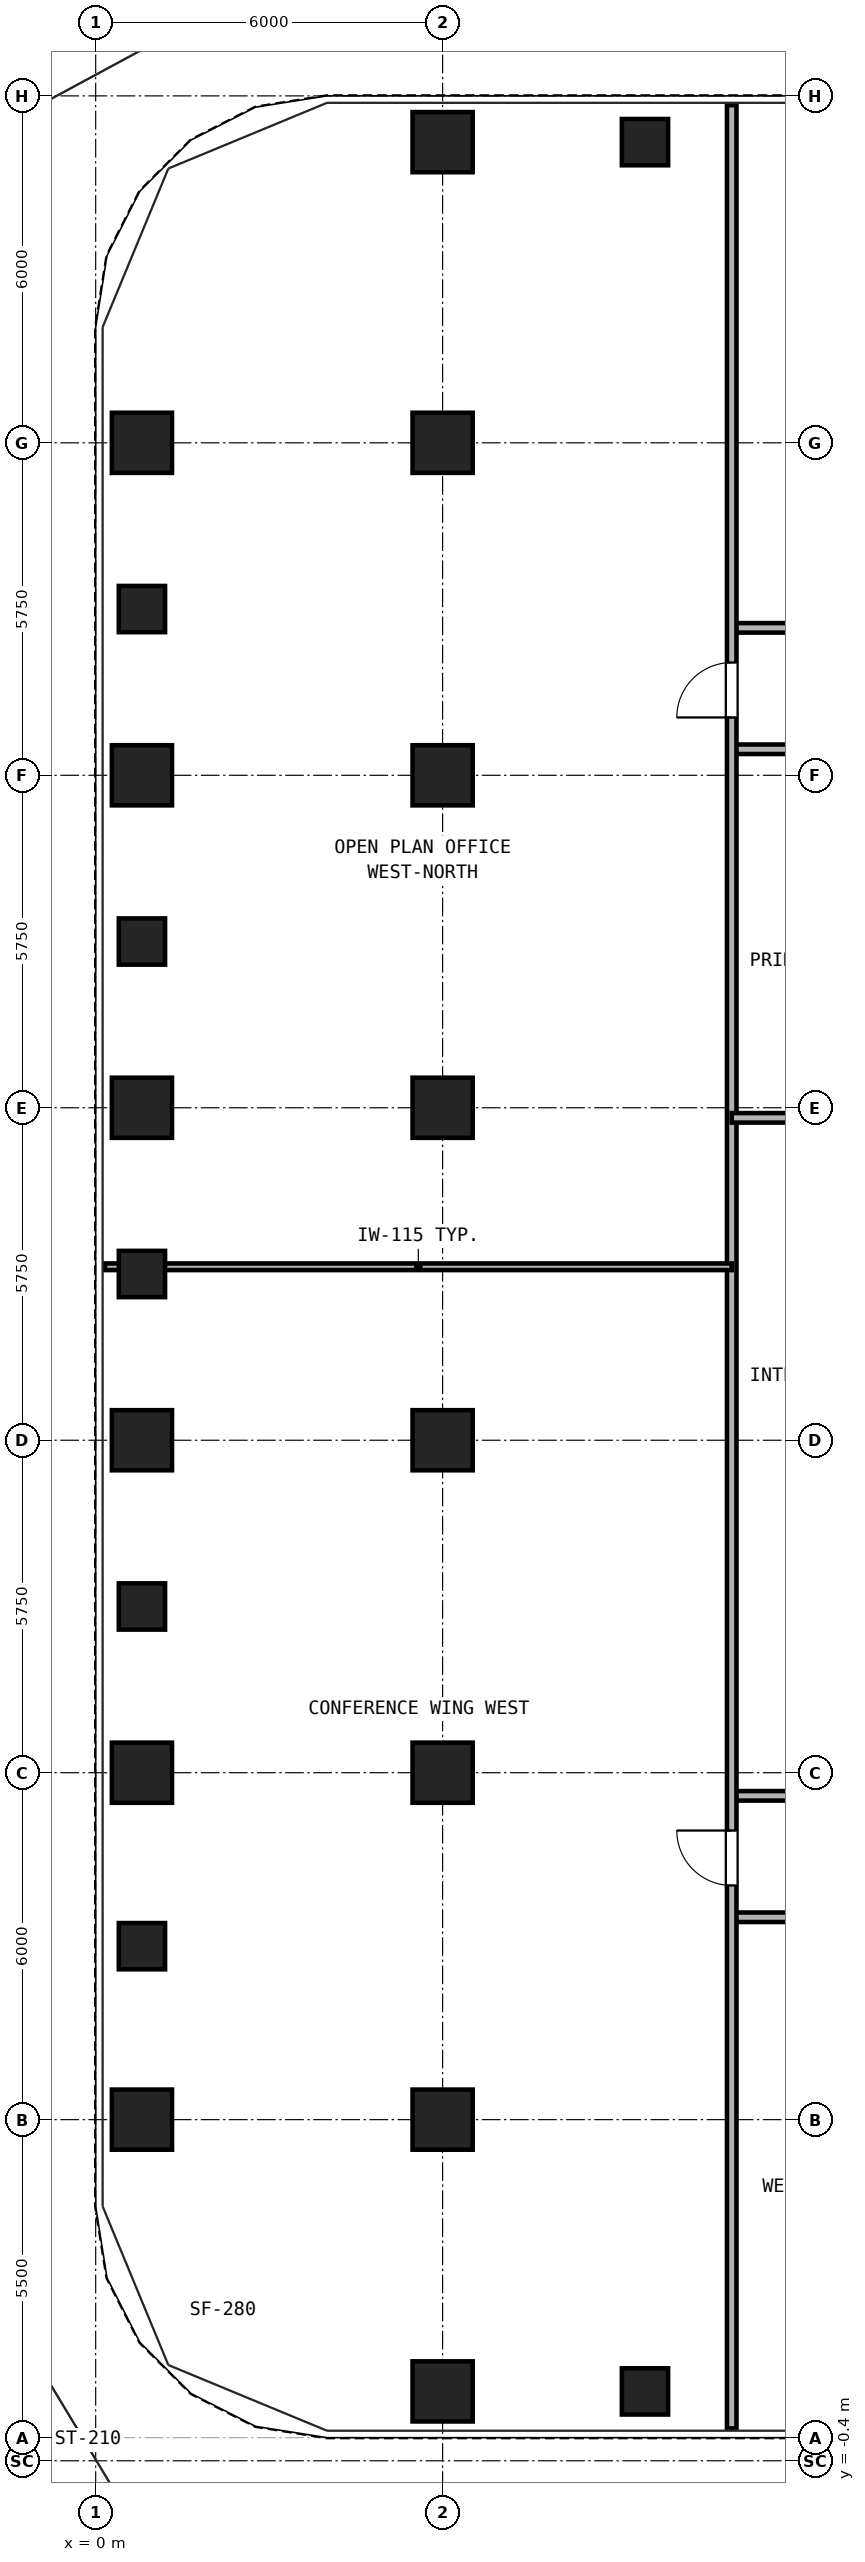
"""IFC4 building model, lengths in metres.
Left out: names, types, materials, properties, quantities, classifications, styles, units other than length and angle.
Written with IfcOpenShell. Run it as: python <this file> out.ifc"""

import sys

from ifc_helpers import new_model, si_unit, direction, frame, frame_2d, origin, origin_2d, place, context, subcontext, project, spatial, rectangle, hollow_rectangle, extrude, source, transform, mapped, element, fill, save


model = new_model("IFC4")
c1 = context("Model", 3, precision=1e-05, world=origin(), true_north=direction((0.0, 1.0)))
c2 = subcontext(c1, "Body", "Model", "MODEL_VIEW")
j1 = project(units=[si_unit("LENGTHUNIT", "METRE"), si_unit("PLANEANGLEUNIT", "RADIAN")], contexts=[c1])
p1 = place(None, origin())
s1 = spatial("IfcSite", under=j1, at=p1, CompositionType="ELEMENT")
p2 = place(p1, origin())
s2 = spatial("IfcBuilding", under=s1, at=p2, CompositionType="ELEMENT")
p3 = place(p2, frame((0.0, 0.0, 72.9)))
s3 = spatial("IfcBuildingStorey", under=s2, at=p3, CompositionType="ELEMENT", Elevation=72.9)
m1 = source(origin(), c2, "Body", "SweptSolid", [
    extrude(hollow_rectangle(XDim=1.04, YDim=1.04, WallThickness=0.065, at=origin_2d()), origin(), (0.0, 0.0, 1.0), 3.24),
])
for number, where, z_axis, x_axis in (
    (1, (6.0, 0.8, 0.0), (0.0, 0.0, 1.0), (1.0, 0.0, 0.0)),
    (2, (6.0, 39.7, 0.0), (0.0, 0.0, 1.0), (1.0, 0.0, 0.0)),
    (3, (0.8, 5.5, 0.0), (0.0, 0.0, 1.0), (1.0, 0.0, 0.0)),
    (4, (0.8, 11.5, 0.0), (0.0, 0.0, 1.0), (1.0, 0.0, 0.0)),
    (5, (0.8, 17.25, 0.0), (0.0, 0.0, 1.0), (1.0, 0.0, 0.0)),
    (6, (0.8, 23.0, 0.0), (0.0, 0.0, 1.0), (1.0, 0.0, 0.0)),
    (7, (0.8, 28.75, 0.0), (0.0, 0.0, 1.0), (1.0, 0.0, 0.0)),
    (8, (0.8, 34.5, 0.0), (0.0, 0.0, 1.0), (1.0, 0.0, 0.0)),
    (9, (6.0, 5.5, 0.0), (0.0, 0.0, 1.0), (1.0, 0.0, 0.0)),
    (10, (6.0, 11.5, 0.0), (0.0, 0.0, 1.0), (1.0, 0.0, 0.0)),
    (11, (6.0, 17.25, 0.0), (0.0, 0.0, 1.0), (1.0, 0.0, 0.0)),
    (12, (6.0, 23.0, 0.0), (0.0, 0.0, 1.0), (1.0, 0.0, 0.0)),
    (13, (6.0, 28.75, 0.0), (0.0, 0.0, 1.0), (1.0, 0.0, 0.0)),
    (14, (6.0, 34.5, 0.0), (0.0, 0.0, 1.0), (1.0, 0.0, 0.0)),
):
    element("IfcColumn", number, at=place(p3, frame(where, z_axis=z_axis, x_axis=x_axis)), inside=s3, PredefinedType="COLUMN", context=c2, shape_type="MappedRepresentation", body=[
        mapped(m1, transform((0.0, 0.0, 0.0), x_axis=(1.0, 0.0, 0.0), y_axis=(0.0, 1.0, 0.0), z_axis=(0.0, 0.0, 1.0), scale=1.0)),
    ])
m2 = source(origin(), c2, "Body", "SweptSolid", [
    extrude(hollow_rectangle(XDim=0.8, YDim=0.8, WallThickness=0.045, at=origin_2d()), origin(), (0.0, 0.0, 1.0), 3.24),
])
for number, where, z_axis, x_axis in (
    (15, (9.5, 0.8, 0.0), (0.0, 0.0, 1.0), (1.0, 0.0, 0.0)),
    (16, (9.5, 39.7, 0.0), (0.0, 0.0, 1.0), (1.0, 0.0, 0.0)),
    (17, (0.8, 8.5, 0.0), (0.0, 0.0, 1.0), (1.0, 0.0, 0.0)),
    (18, (0.8, 14.375, 0.0), (0.0, 0.0, 1.0), (1.0, 0.0, 0.0)),
    (19, (0.8, 20.125, 0.0), (0.0, 0.0, 1.0), (1.0, 0.0, 0.0)),
    (20, (0.8, 25.875, 0.0), (0.0, 0.0, 1.0), (1.0, 0.0, 0.0)),
    (21, (0.8, 31.625, 0.0), (0.0, 0.0, 1.0), (1.0, 0.0, 0.0)),
):
    element("IfcColumn", number, at=place(p3, frame(where, z_axis=z_axis, x_axis=x_axis)), inside=s3, PredefinedType="COLUMN", context=c2, shape_type="MappedRepresentation", body=[
        mapped(m2, transform((0.0, 0.0, 0.0), x_axis=(1.0, 0.0, 0.0), y_axis=(0.0, 1.0, 0.0), z_axis=(0.0, 0.0, 1.0), scale=1.0)),
    ])
p4 = place(p3, frame((11.0, 9.0, 0.0), z_axis=(0.0, 0.0, 1.0), x_axis=(1.0, 0.0, 0.0)))
e22 = element("IfcWall", 22, at=p4, inside=s3, PredefinedType="PARTITIONING", context=c2, shape_type="SweptSolid", body=[
    extrude(rectangle(XDim=25.0, YDim=0.165, at=frame_2d((12.5, 0.0))), origin(), (0.0, 0.0, 1.0), 3.24),
])
p5 = place(p4, frame((2.25, 0.0, 0.0)))
e23 = element("IfcOpeningElement", 23, at=p5, cuts=e22, PredefinedType="OPENING", context=c2, shape_type="SweptSolid", body=[
    extrude(rectangle(XDim=0.95, YDim=2.15, at=frame_2d((0.475, 1.075))), frame((0.0, 0.093, 0.0), z_axis=(0.0, -1.0, 0.0), x_axis=(1.0, 0.0, 0.0)), (0.0, 0.0, 1.0), 0.185),
])
p6 = place(p4, frame((8.0, 0.0, 0.0)))
e24 = element("IfcOpeningElement", 24, at=p6, cuts=e22, PredefinedType="OPENING", context=c2, shape_type="SweptSolid", body=[
    extrude(rectangle(XDim=0.95, YDim=2.15, at=frame_2d((0.475, 1.075))), frame((0.0, 0.093, 0.0), z_axis=(0.0, -1.0, 0.0), x_axis=(1.0, 0.0, 0.0)), (0.0, 0.0, 1.0), 0.185),
])
p7 = place(p4, frame((14.0, 0.0, 0.0)))
e25 = element("IfcOpeningElement", 25, at=p7, cuts=e22, PredefinedType="OPENING", context=c2, shape_type="SweptSolid", body=[
    extrude(rectangle(XDim=0.95, YDim=2.15, at=frame_2d((0.475, 1.075))), frame((0.0, 0.093, 0.0), z_axis=(0.0, -1.0, 0.0), x_axis=(1.0, 0.0, 0.0)), (0.0, 0.0, 1.0), 0.185),
])
p8 = place(p4, frame((19.5, 0.0, 0.0)))
e26 = element("IfcOpeningElement", 26, at=p8, cuts=e22, PredefinedType="OPENING", context=c2, shape_type="SweptSolid", body=[
    extrude(rectangle(XDim=0.95, YDim=2.15, at=frame_2d((0.475, 1.075))), frame((0.0, 0.093, 0.0), z_axis=(0.0, -1.0, 0.0), x_axis=(1.0, 0.0, 0.0)), (0.0, 0.0, 1.0), 0.185),
])
p9 = place(p4, frame((23.25, 0.0, 0.0)))
e27 = element("IfcOpeningElement", 27, at=p9, cuts=e22, PredefinedType="OPENING", context=c2, shape_type="SweptSolid", body=[
    extrude(rectangle(XDim=0.92, YDim=2.1, at=frame_2d((0.46, 1.05))), frame((0.0, 0.093, 0.0), z_axis=(0.0, -1.0, 0.0), x_axis=(1.0, 0.0, 0.0)), (0.0, 0.0, 1.0), 0.185),
])
p10 = place(p3, frame((11.0, 31.3, 0.0), z_axis=(0.0, 0.0, 1.0), x_axis=(1.0, 0.0, 0.0)))
e28 = element("IfcWall", 28, at=p10, inside=s3, PredefinedType="PARTITIONING", context=c2, shape_type="SweptSolid", body=[
    extrude(rectangle(XDim=25.0, YDim=0.165, at=frame_2d((12.5, 0.0))), origin(), (0.0, 0.0, 1.0), 3.24),
])
p11 = place(p10, frame((4.25, 0.0, 0.0)))
e29 = element("IfcOpeningElement", 29, at=p11, cuts=e28, PredefinedType="OPENING", context=c2, shape_type="SweptSolid", body=[
    extrude(rectangle(XDim=0.95, YDim=2.15, at=frame_2d((0.475, 1.075))), frame((0.0, 0.093, 0.0), z_axis=(0.0, -1.0, 0.0), x_axis=(1.0, 0.0, 0.0)), (0.0, 0.0, 1.0), 0.185),
])
p12 = place(p10, frame((12.0, 0.0, 0.0)))
e30 = element("IfcOpeningElement", 30, at=p12, cuts=e28, PredefinedType="OPENING", context=c2, shape_type="SweptSolid", body=[
    extrude(rectangle(XDim=0.95, YDim=2.15, at=frame_2d((0.475, 1.075))), frame((0.0, 0.093, 0.0), z_axis=(0.0, -1.0, 0.0), x_axis=(1.0, 0.0, 0.0)), (0.0, 0.0, 1.0), 0.185),
])
p13 = place(p10, frame((17.5, 0.0, 0.0)))
e31 = element("IfcOpeningElement", 31, at=p13, cuts=e28, PredefinedType="OPENING", context=c2, shape_type="SweptSolid", body=[
    extrude(rectangle(XDim=0.95, YDim=2.15, at=frame_2d((0.475, 1.075))), frame((0.0, 0.093, 0.0), z_axis=(0.0, -1.0, 0.0), x_axis=(1.0, 0.0, 0.0)), (0.0, 0.0, 1.0), 0.185),
])
p14 = place(p10, frame((22.25, 0.0, 0.0)))
e32 = element("IfcOpeningElement", 32, at=p14, cuts=e28, PredefinedType="OPENING", context=c2, shape_type="SweptSolid", body=[
    extrude(rectangle(XDim=0.95, YDim=2.15, at=frame_2d((0.475, 1.075))), frame((0.0, 0.093, 0.0), z_axis=(0.0, -1.0, 0.0), x_axis=(1.0, 0.0, 0.0)), (0.0, 0.0, 1.0), 0.185),
])
for number, where, z_axis, x_axis in (
    (33, (11.0, 11.1, 0.0), (0.0, 0.0, 1.0), (1.0, 0.0, 0.0)),
    (34, (11.0, 29.2, 0.0), (0.0, 0.0, 1.0), (1.0, 0.0, 0.0)),
):
    element("IfcWall", number, at=place(p3, frame(where, z_axis=z_axis, x_axis=x_axis)), inside=s3, PredefinedType="PARTITIONING", context=c2, shape_type="SweptSolid", body=[
        extrude(rectangle(XDim=5.3, YDim=0.165, at=frame_2d((2.65, 0.0))), origin(), (0.0, 0.0, 1.0), 3.24),
    ])
p15 = place(p3, frame((11.0, 0.16, 0.0), z_axis=(0.0, 0.0, 1.0), x_axis=(0.0, 1.0, 0.0)))
e35 = element("IfcWall", 35, at=p15, inside=s3, PredefinedType="PARTITIONING", context=c2, shape_type="SweptSolid", body=[
    extrude(rectangle(XDim=40.18, YDim=0.165, at=frame_2d((20.09, 0.0))), origin(), (0.0, 0.0, 1.0), 3.24),
])
p16 = place(p15, frame((9.39, 0.0, 0.0)))
e36 = element("IfcOpeningElement", 36, at=p16, cuts=e35, PredefinedType="OPENING", context=c2, shape_type="SweptSolid", body=[
    extrude(rectangle(XDim=0.95, YDim=2.15, at=frame_2d((0.475, 1.075))), frame((0.0, 0.093, 0.0), z_axis=(0.0, -1.0, 0.0), x_axis=(1.0, 0.0, 0.0)), (0.0, 0.0, 1.0), 0.185),
])
p17 = place(p15, frame((29.59, 0.0, 0.0)))
e37 = element("IfcOpeningElement", 37, at=p17, cuts=e35, PredefinedType="OPENING", context=c2, shape_type="SweptSolid", body=[
    extrude(rectangle(XDim=0.95, YDim=2.15, at=frame_2d((0.475, 1.075))), frame((0.0, 0.093, 0.0), z_axis=(0.0, -1.0, 0.0), x_axis=(1.0, 0.0, 0.0)), (0.0, 0.0, 1.0), 0.185),
])
p18 = place(p3, frame((0.16, 20.25, 0.0), z_axis=(0.0, 0.0, 1.0), x_axis=(1.0, 0.0, 0.0)))
e38 = element("IfcWall", 38, at=p18, inside=s3, PredefinedType="PARTITIONING", context=c2, shape_type="SweptSolid", body=[
    extrude(rectangle(XDim=10.84, YDim=0.115, at=frame_2d((5.42, 0.0))), origin(), (0.0, 0.0, 1.0), 2.818),
])
p19 = place(p3, frame((11.0, 22.826, 0.0), z_axis=(0.0, 0.0, 1.0), x_axis=(1.0, 0.0, 0.0)))
e39 = element("IfcWall", 39, at=p19, inside=s3, PredefinedType="PARTITIONING", context=c2, shape_type="SweptSolid", body=[
    extrude(rectangle(XDim=5.3, YDim=0.165, at=frame_2d((2.65, 0.0))), origin(), (0.0, 0.0, 1.0), 2.459),
])
p20 = place(p16, frame((0.95, 0.0, 0.0), z_axis=(0.0, 0.0, 1.0), x_axis=(-1.0, 0.0, 0.0)))
e40 = element("IfcDoor", 40, at=p20, inside=s3, OperationType="SINGLE_SWING_RIGHT", PredefinedType="DOOR", context=c2, shape_type="SweptSolid", body=[
    extrude(rectangle(XDim=0.95, YDim=2.15, at=frame_2d((0.475, 1.075))), frame((0.0, 0.025, 0.0), z_axis=(0.0, -1.0, 0.0), x_axis=(1.0, 0.0, 0.0)), (0.0, 0.0, 1.0), 0.05),
])
fill(e36, e40)
p21 = place(p17, frame((0.95, 0.0, 0.0), z_axis=(0.0, 0.0, 1.0), x_axis=(-1.0, 0.0, 0.0)))
e41 = element("IfcDoor", 41, at=p21, inside=s3, OperationType="SINGLE_SWING_LEFT", PredefinedType="DOOR", context=c2, shape_type="SweptSolid", body=[
    extrude(rectangle(XDim=0.95, YDim=2.15, at=frame_2d((0.475, 1.075))), frame((0.0, 0.025, 0.0), z_axis=(0.0, -1.0, 0.0), x_axis=(1.0, 0.0, 0.0)), (0.0, 0.0, 1.0), 0.05),
])
fill(e37, e41)
save(model, sys.argv[1])
